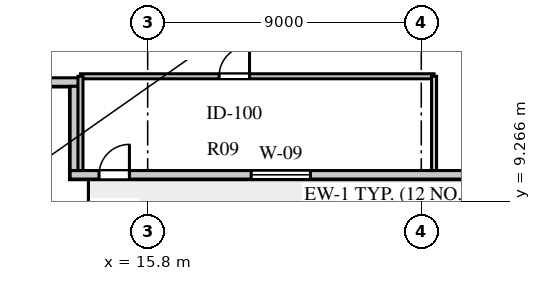
"""IFC4 building model, lengths in metres.
Left out: names, types, materials, properties, quantities, classifications, styles, units other than length and angle.
Written with IfcOpenShell. Run it as: python <this file> out.ifc"""

import sys

from ifc_helpers import new_model, si_unit, direction, frame, frame_2d, origin, place, context, subcontext, project, spatial, rectangle, extrude, element, fill, save


model = new_model("IFC4")
c1 = context("Model", 3, precision=1e-05, world=origin(), true_north=direction((0.0, 1.0)))
c2 = subcontext(c1, "Body", "Model", "MODEL_VIEW")
j1 = project(units=[si_unit("LENGTHUNIT", "METRE"), si_unit("PLANEANGLEUNIT", "RADIAN")], contexts=[c1])
p1 = place(None, origin())
s1 = spatial("IfcSite", under=j1, at=p1, CompositionType="ELEMENT")
p2 = place(p1, origin())
s2 = spatial("IfcBuilding", under=s1, at=p2, CompositionType="ELEMENT")
p3 = place(p2, frame((0.0, 0.0, 142.5)))
s3 = spatial("IfcBuildingStorey", under=s2, at=p3, CompositionType="ELEMENT", Elevation=142.5)
p4 = place(p3, frame((13.25, 10.14, 0.0), z_axis=(0.0, 0.0, 1.0), x_axis=(1.0, 0.0, 0.0)))
e1 = element("IfcWall", 1, at=p4, inside=s3, PredefinedType="STANDARD", context=c2, shape_type="SweptSolid", body=[
    extrude(rectangle(XDim=32.1, YDim=0.28, at=frame_2d((16.05, 0.0))), origin(), (0.0, 0.0, 1.0), 3.6),
])
p5 = place(p4, frame((0.95, 0.0, 0.0)))
e2 = element("IfcOpeningElement", 2, at=p5, cuts=e1, PredefinedType="OPENING", context=c2, shape_type="SweptSolid", body=[
    extrude(rectangle(XDim=1.0, YDim=2.05, at=frame_2d((0.5, 1.025))), frame((0.0, 0.15, 0.0), z_axis=(0.0, -1.0, 0.0), x_axis=(1.0, 0.0, 0.0)), (0.0, 0.0, 1.0), 0.3),
])
p6 = place(p4, frame((5.955, 0.0, 0.8)))
e3 = element("IfcOpeningElement", 3, at=p6, cuts=e1, PredefinedType="OPENING", context=c2, shape_type="SweptSolid", body=[
    extrude(rectangle(XDim=1.95, YDim=2.0, at=frame_2d((0.975, 1.0))), frame((0.0, 0.15, 0.0), z_axis=(0.0, -1.0, 0.0), x_axis=(1.0, 0.0, 0.0)), (0.0, 0.0, 1.0), 0.3),
])
p7 = place(p4, frame((12.91, 0.0, 0.8)))
e4 = element("IfcOpeningElement", 4, at=p7, cuts=e1, PredefinedType="OPENING", context=c2, shape_type="SweptSolid", body=[
    extrude(rectangle(XDim=1.2, YDim=1.75, at=frame_2d((0.6, 0.875))), frame((0.0, 0.15, 0.0), z_axis=(0.0, -1.0, 0.0), x_axis=(1.0, 0.0, 0.0)), (0.0, 0.0, 1.0), 0.3),
])
p8 = place(p4, frame((15.7, 0.0, 0.8)))
e5 = element("IfcOpeningElement", 5, at=p8, cuts=e1, PredefinedType="OPENING", context=c2, shape_type="SweptSolid", body=[
    extrude(rectangle(XDim=1.8, YDim=2.0, at=frame_2d((0.9, 1.0))), frame((0.0, 0.15, 0.0), z_axis=(0.0, -1.0, 0.0), x_axis=(1.0, 0.0, 0.0)), (0.0, 0.0, 1.0), 0.3),
])
p9 = place(p4, frame((18.95, 0.0, 0.8)))
e6 = element("IfcOpeningElement", 6, at=p9, cuts=e1, PredefinedType="OPENING", context=c2, shape_type="SweptSolid", body=[
    extrude(rectangle(XDim=1.5, YDim=2.0, at=frame_2d((0.75, 1.0))), frame((0.0, 0.15, 0.0), z_axis=(0.0, -1.0, 0.0), x_axis=(1.0, 0.0, 0.0)), (0.0, 0.0, 1.0), 0.3),
])
p10 = place(p4, frame((22.2, 0.0, 0.8)))
e7 = element("IfcOpeningElement", 7, at=p10, cuts=e1, PredefinedType="OPENING", context=c2, shape_type="SweptSolid", body=[
    extrude(rectangle(XDim=1.2, YDim=1.75, at=frame_2d((0.6, 0.875))), frame((0.0, 0.15, 0.0), z_axis=(0.0, -1.0, 0.0), x_axis=(1.0, 0.0, 0.0)), (0.0, 0.0, 1.0), 0.3),
])
p11 = place(p4, frame((25.36, 0.0, 0.8)))
e8 = element("IfcOpeningElement", 8, at=p11, cuts=e1, PredefinedType="OPENING", context=c2, shape_type="SweptSolid", body=[
    extrude(rectangle(XDim=1.2, YDim=1.75, at=frame_2d((0.6, 0.875))), frame((0.0, 0.15, 0.0), z_axis=(0.0, -1.0, 0.0), x_axis=(1.0, 0.0, 0.0)), (0.0, 0.0, 1.0), 0.3),
])
p12 = place(p4, frame((28.73, 0.0, 0.8)))
e9 = element("IfcOpeningElement", 9, at=p12, cuts=e1, PredefinedType="OPENING", context=c2, shape_type="SweptSolid", body=[
    extrude(rectangle(XDim=2.1, YDim=1.95, at=frame_2d((1.05, 0.975))), frame((0.0, 0.15, 0.0), z_axis=(0.0, -1.0, 0.0), x_axis=(1.0, 0.0, 0.0)), (0.0, 0.0, 1.0), 0.3),
])
p13 = place(p3, frame((10.2, 13.19, 0.0), z_axis=(0.0, 0.0, 1.0), x_axis=(1.0, 0.0, 0.0)))
e10 = element("IfcWall", 10, at=p13, inside=s3, PredefinedType="STANDARD", context=c2, shape_type="SweptSolid", body=[
    extrude(rectangle(XDim=3.33, YDim=0.28, at=frame_2d((1.665, 0.0))), origin(), (0.0, 0.0, 1.0), 3.6),
])
p14 = place(p3, frame((13.39, 13.05, 0.0), z_axis=(0.0, 0.0, 1.0), x_axis=(0.0, -1.0, 0.0)))
e11 = element("IfcWall", 11, at=p14, inside=s3, PredefinedType="STANDARD", context=c2, shape_type="SweptSolid", body=[
    extrude(rectangle(XDim=2.77, YDim=0.28, at=frame_2d((1.385, 0.0))), origin(), (0.0, 0.0, 1.0), 3.6),
])
p15 = place(p3, frame((13.59, 13.38, 0.0), z_axis=(0.0, 0.0, 1.0), x_axis=(1.0, 0.0, 0.0)))
e12 = element("IfcWall", 12, at=p15, inside=s3, PredefinedType="PARTITIONING", context=c2, shape_type="SweptSolid", body=[
    extrude(rectangle(XDim=11.63, YDim=0.165, at=frame_2d((5.815, 0.0))), origin(), (0.0, 0.0, 1.0), 3.6),
])
p16 = place(p15, frame((4.56, 0.0, 0.0)))
e13 = element("IfcOpeningElement", 13, at=p16, cuts=e12, PredefinedType="OPENING", context=c2, shape_type="SweptSolid", body=[
    extrude(rectangle(XDim=1.0, YDim=2.08, at=frame_2d((0.5, 1.04))), frame((0.0, 0.093, 0.0), z_axis=(0.0, -1.0, 0.0), x_axis=(1.0, 0.0, 0.0)), (0.0, 0.0, 1.0), 0.185),
])
p17 = place(p3, frame((13.59, 10.28, 0.0), z_axis=(0.0, 0.0, 1.0), x_axis=(0.0, 1.0, 0.0)))
e14 = element("IfcWall", 14, at=p17, inside=s3, PredefinedType="PARTITIONING", context=c2, shape_type="SweptSolid", body=[
    extrude(rectangle(XDim=3.1, YDim=0.165, at=frame_2d((1.55, 0.0))), origin(), (0.0, 0.0, 1.0), 3.6),
])
p18 = place(p3, frame((25.22, 10.28, 0.0), z_axis=(0.0, 0.0, 1.0), x_axis=(0.0, 1.0, 0.0)))
e15 = element("IfcWall", 15, at=p18, inside=s3, PredefinedType="PARTITIONING", context=c2, shape_type="SweptSolid", body=[
    extrude(rectangle(XDim=3.1, YDim=0.165, at=frame_2d((1.55, 0.0))), origin(), (0.0, 0.0, 1.0), 3.1),
])
p19 = place(p5, frame((1.0, 0.0, 0.0), z_axis=(0.0, 0.0, 1.0), x_axis=(-1.0, 0.0, 0.0)))
e16 = element("IfcDoor", 16, at=p19, inside=s3, OperationType="SINGLE_SWING_LEFT", PredefinedType="DOOR", context=c2, shape_type="SweptSolid", body=[
    extrude(rectangle(XDim=1.0, YDim=2.05, at=frame_2d((0.5, 1.025))), frame((0.0, 0.025, 0.0), z_axis=(0.0, -1.0, 0.0), x_axis=(1.0, 0.0, 0.0)), (0.0, 0.0, 1.0), 0.05),
])
fill(e2, e16)
p20 = place(p6, origin())
e17 = element("IfcWindow", 17, at=p20, inside=s3, PartitioningType="SINGLE_PANEL", PredefinedType="WINDOW", context=c2, shape_type="SweptSolid", body=[
    extrude(rectangle(XDim=1.95, YDim=2.0, at=frame_2d((0.975, 1.0))), frame((0.0, 0.03, 0.0), z_axis=(0.0, -1.0, 0.0), x_axis=(1.0, 0.0, 0.0)), (0.0, 0.0, 1.0), 0.06),
])
fill(e3, e17)
p21 = place(p16, frame((1.0, 0.0, 0.0), z_axis=(0.0, 0.0, 1.0), x_axis=(-1.0, 0.0, 0.0)))
e18 = element("IfcDoor", 18, at=p21, inside=s3, OperationType="SINGLE_SWING_LEFT", PredefinedType="DOOR", context=c2, shape_type="SweptSolid", body=[
    extrude(rectangle(XDim=1.0, YDim=2.08, at=frame_2d((0.5, 1.04))), frame((0.0, 0.025, 0.0), z_axis=(0.0, -1.0, 0.0), x_axis=(1.0, 0.0, 0.0)), (0.0, 0.0, 1.0), 0.05),
])
fill(e13, e18)
save(model, sys.argv[1])
